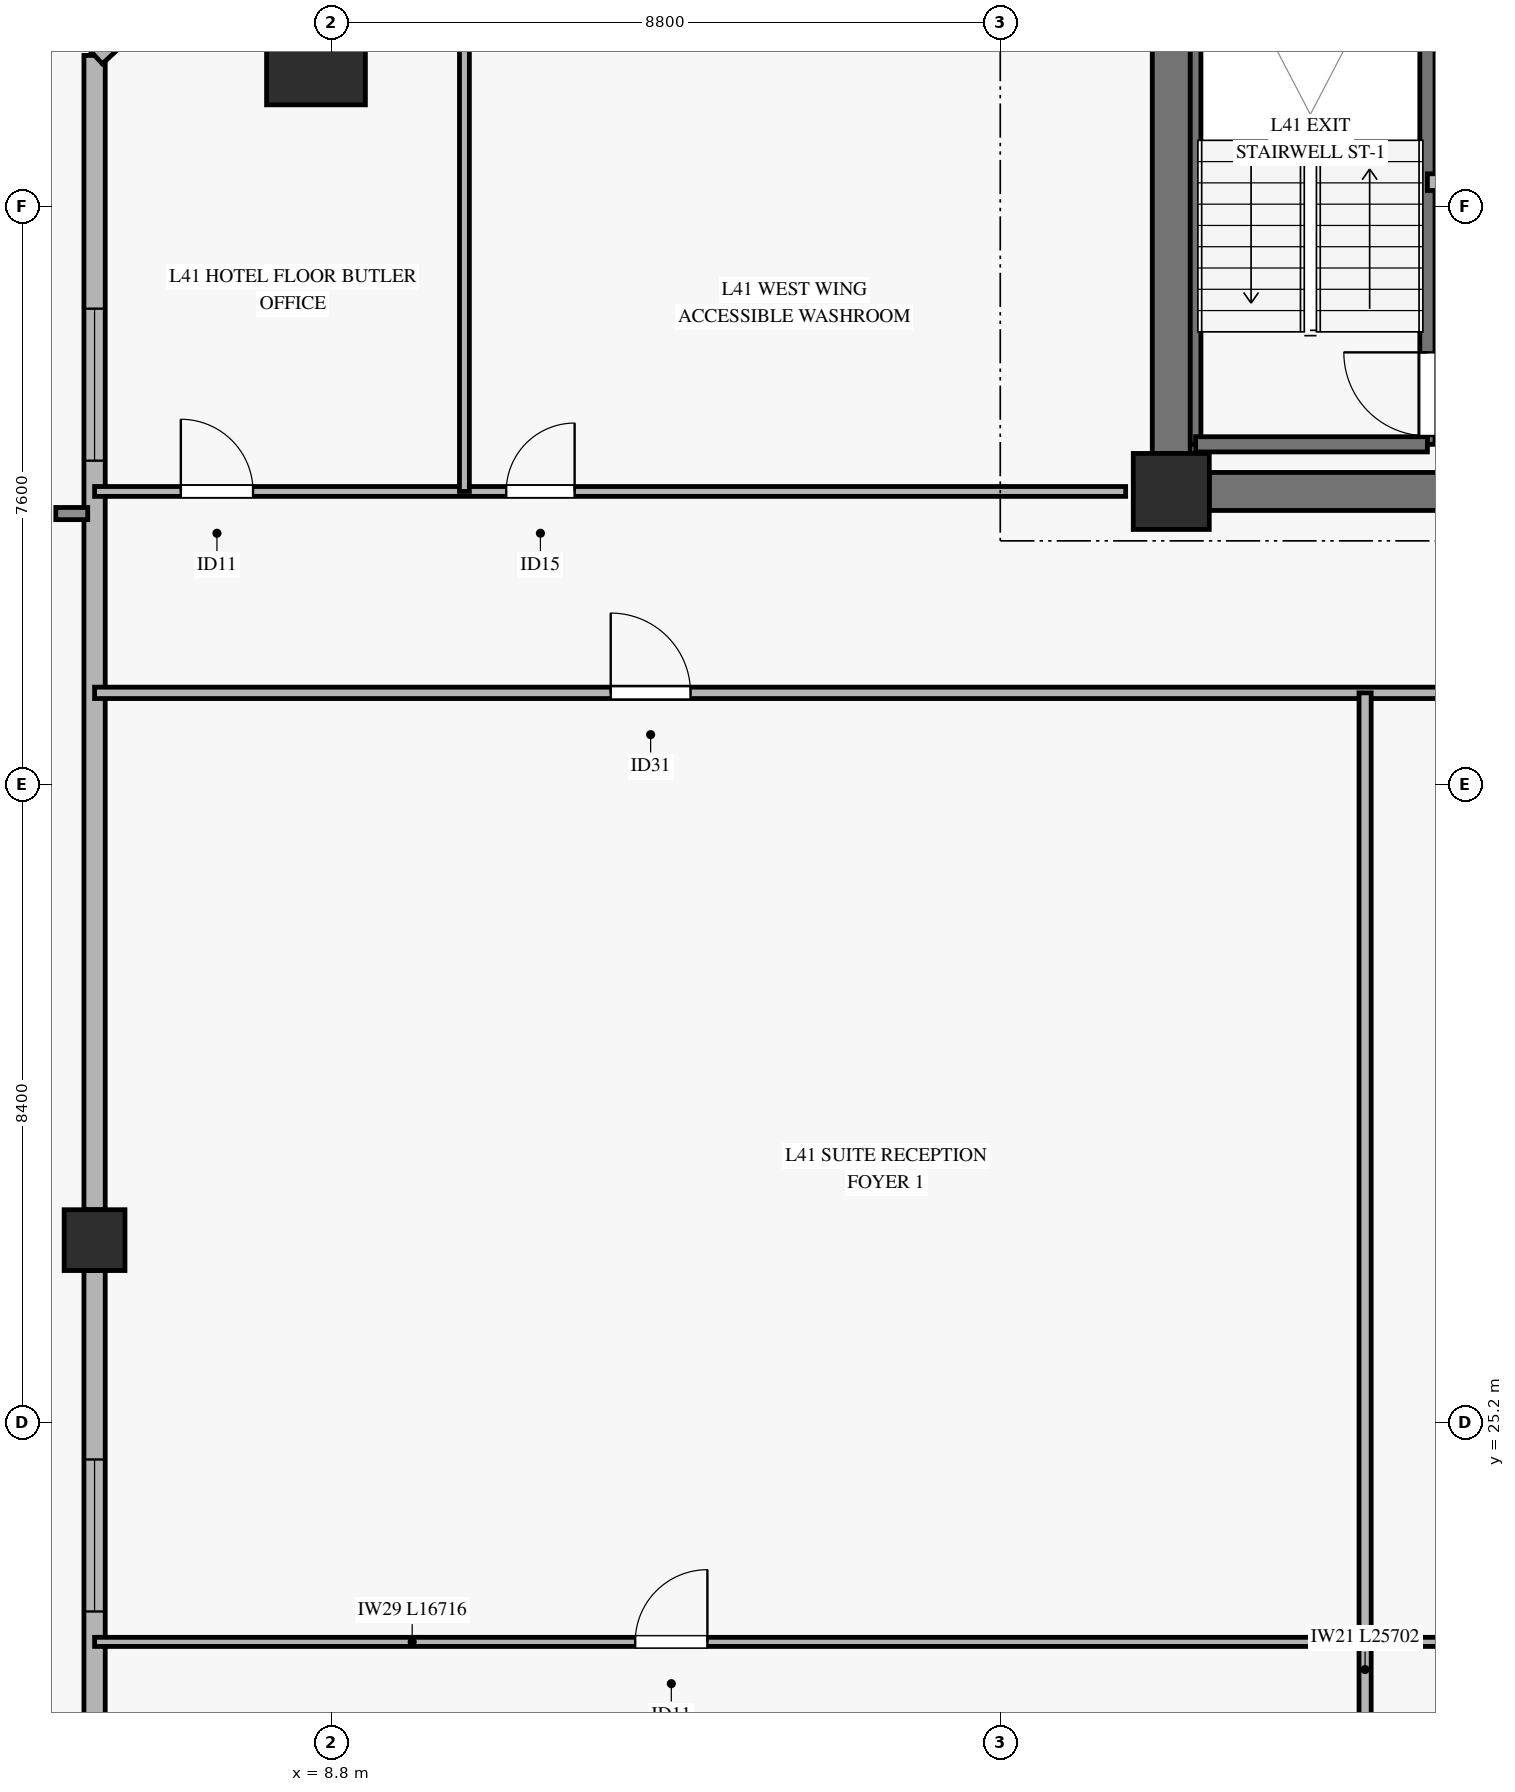
"""IFC4 building model, lengths in metres.
Left out: names, types, materials, properties, quantities, classifications, styles, units other than length and angle.
Written with IfcOpenShell. Run it as: python <this file> out.ifc"""

import sys

from ifc_helpers import new_model, si_unit, direction, frame, frame_2d, origin, origin_2d, place, context, subcontext, project, spatial, rectangle, hollow_rectangle, extrude, source, transform, mapped, element, fill, save


model = new_model("IFC4")
c1 = context("Model", 3, precision=1e-05, world=origin(), true_north=direction((0.0, 1.0)))
c2 = subcontext(c1, "Body", "Model", "MODEL_VIEW")
j1 = project(units=[si_unit("LENGTHUNIT", "METRE"), si_unit("PLANEANGLEUNIT", "RADIAN")], contexts=[c1])
p1 = place(None, origin())
s1 = spatial("IfcSite", under=j1, at=p1, CompositionType="ELEMENT")
p2 = place(p1, origin())
s2 = spatial("IfcBuilding", under=s1, at=p2, CompositionType="ELEMENT")
p3 = place(p2, frame((0.0, 0.0, 166.7)))
s3 = spatial("IfcBuildingStorey", under=s2, at=p3, CompositionType="ELEMENT", Elevation=166.7)
m1 = source(origin(), c2, "Body", "SweptSolid", [
    extrude(rectangle(XDim=1.0, YDim=1.0, at=origin_2d()), origin(), (0.0, 0.0, 1.0), 3.27),
])
p4 = place(p3, frame((19.85, 37.45, 0.0), z_axis=(0.0, 0.0, 1.0), x_axis=(1.0, 0.0, 0.0)))
e1 = element("IfcColumn", 1, at=p4, inside=s3, PredefinedType="PILASTER", context=c2, shape_type="MappedRepresentation", body=[
    mapped(m1, transform((0.0, 0.0, 0.0), x_axis=(1.0, 0.0, 0.0), y_axis=(0.0, 1.0, 0.0), z_axis=(0.0, 0.0, 1.0), scale=1.0)),
])
p5 = place(p3, frame((20.35, 37.45, 0.0), z_axis=(0.0, 0.0, 1.0), x_axis=(1.0, 0.0, 0.0)))
e2 = element("IfcWall", 2, at=p5, inside=s3, PredefinedType="SHEAR", context=c2, shape_type="SweptSolid", body=[
    extrude(rectangle(XDim=9.95, YDim=0.5, at=frame_2d((4.975, 0.0))), origin(), (0.0, 0.0, 1.0), 3.27),
])
p6 = place(p5, frame((4.2, 0.0, 0.0)))
e3 = element("IfcOpeningElement", 3, at=p6, cuts=e2, PredefinedType="OPENING", context=c2, shape_type="SweptSolid", body=[
    extrude(rectangle(XDim=1.2, YDim=2.15, at=frame_2d((0.6, 1.075))), frame((0.0, 0.26, 0.0), z_axis=(0.0, -1.0, 0.0), x_axis=(1.0, 0.0, 0.0)), (0.0, 0.0, 1.0), 0.52),
])
p7 = place(p3, frame((19.85, 37.95, 0.0), z_axis=(0.0, 0.0, 1.0), x_axis=(0.0, 1.0, 0.0)))
e4 = element("IfcWall", 4, at=p7, inside=s3, PredefinedType="SHEAR", context=c2, shape_type="SweptSolid", body=[
    extrude(rectangle(XDim=8.1, YDim=0.5, at=frame_2d((4.05, 0.0))), origin(), (0.0, 0.0, 1.0), 3.27),
])
m2 = source(origin(), c2, "Body", "SweptSolid", [
    extrude(hollow_rectangle(XDim=1.3, YDim=1.3, WallThickness=0.06, at=origin_2d()), origin(), (0.0, 0.0, 1.0), 3.277),
])
p8 = place(p3, frame((8.597, 43.187, 0.0), z_axis=(0.063777107469, 0.007897632467, 0.997932917567), x_axis=(-0.122893119903, 0.992419911671, 0.0)))
e5 = element("IfcColumn", 5, at=p8, inside=s3, PredefinedType="COLUMN", context=c2, shape_type="MappedRepresentation", body=[
    mapped(m2, transform((0.0, 0.0, 0.0), x_axis=(1.0, 0.0, 0.0), y_axis=(0.0, 1.0, 0.0), z_axis=(0.0, 0.0, 1.0), scale=1.0)),
])
m3 = source(origin(), c2, "Body", "SweptSolid", [
    extrude(hollow_rectangle(XDim=0.8, YDim=0.8, WallThickness=0.036, at=origin_2d()), origin(), (0.0, 0.0, 1.0), 3.289),
])
p9 = place(p3, frame((5.684, 27.599, 0.0), z_axis=(0.071407666962, 0.080240839902, 0.994214440003), x_axis=(-0.747027925172, 0.664792658664, 0.0)))
e6 = element("IfcColumn", 6, at=p9, inside=s3, PredefinedType="COLUMN", context=c2, shape_type="MappedRepresentation", body=[
    mapped(m3, transform((0.0, 0.0, 0.0), x_axis=(1.0, 0.0, 0.0), y_axis=(0.0, 1.0, 0.0), z_axis=(0.0, 0.0, 1.0), scale=1.0)),
])
p10 = place(p3, frame((5.684, 12.011, 0.0), z_axis=(0.0, 0.0, 1.0), x_axis=(0.0, 1.0, 0.0)))
e7 = element("IfcWall", 7, at=p10, inside=s3, PredefinedType="SOLIDWALL", context=c2, shape_type="SweptSolid", body=[
    extrude(rectangle(XDim=15.188, YDim=0.28, at=frame_2d((7.594, 0.0))), origin(), (0.0, 0.0, 1.0), 2.75),
])
p11 = place(p10, frame((3.189, 0.0, 0.45)))
e8 = element("IfcOpeningElement", 8, at=p11, cuts=e7, PredefinedType="OPENING", context=c2, shape_type="SweptSolid", body=[
    extrude(rectangle(XDim=2.0, YDim=2.0, at=frame_2d((1.0, 1.0))), frame((0.0, 0.15, 0.0), z_axis=(0.0, -1.0, 0.0), x_axis=(1.0, 0.0, 0.0)), (0.0, 0.0, 1.0), 0.3),
])
p12 = place(p10, frame((10.702, 0.0, 0.45)))
e9 = element("IfcOpeningElement", 9, at=p12, cuts=e7, PredefinedType="OPENING", context=c2, shape_type="SweptSolid", body=[
    extrude(rectangle(XDim=2.0, YDim=2.0, at=frame_2d((1.0, 1.0))), frame((0.0, 0.15, 0.0), z_axis=(0.0, -1.0, 0.0), x_axis=(1.0, 0.0, 0.0)), (0.0, 0.0, 1.0), 0.3),
])
p13 = place(p3, frame((5.684, 27.999, 0.0), z_axis=(0.0, 0.0, 1.0), x_axis=(0.0, 1.0, 0.0)))
e10 = element("IfcWall", 10, at=p13, inside=s3, PredefinedType="SOLIDWALL", context=c2, shape_type="SweptSolid", body=[
    extrude(rectangle(XDim=15.188, YDim=0.28, at=frame_2d((7.594, 0.0))), origin(), (0.0, 0.0, 1.0), 2.75),
])
p14 = place(p13, frame((9.856, 0.0, 0.45)))
e11 = element("IfcOpeningElement", 11, at=p14, cuts=e10, PredefinedType="OPENING", context=c2, shape_type="SweptSolid", body=[
    extrude(rectangle(XDim=2.0, YDim=2.0, at=frame_2d((1.0, 1.0))), frame((0.0, 0.15, 0.0), z_axis=(0.0, -1.0, 0.0), x_axis=(1.0, 0.0, 0.0)), (0.0, 0.0, 1.0), 0.3),
])
p15 = place(p3, frame((8.997, 46.25, 0.0), z_axis=(0.0, 0.0, 1.0), x_axis=(-0.734267997056, -0.678859711943, 0.0)))
e12 = element("IfcWall", 12, at=p15, inside=s3, PredefinedType="SOLIDWALL", context=c2, shape_type="SweptSolid", body=[
    extrude(rectangle(XDim=4.512, YDim=0.3, at=frame_2d((2.256, 0.0))), origin(), (0.0, 0.0, 1.0), 2.75),
])
p16 = place(p15, frame((1.456, 0.0, 0.45)))
e13 = element("IfcOpeningElement", 13, at=p16, cuts=e12, PredefinedType="OPENING", context=c2, shape_type="SweptSolid", body=[
    extrude(rectangle(XDim=1.6, YDim=2.0, at=frame_2d((0.8, 1.0))), frame((0.0, 0.16, 0.0), z_axis=(0.0, -1.0, 0.0), x_axis=(1.0, 0.0, 0.0)), (0.0, 0.0, 1.0), 0.32),
])
p17 = place(p3, frame((20.17, 38.07, 0.0), z_axis=(0.0, 0.0, 1.0), x_axis=(0.0, 1.0, 0.0)))
e14 = element("IfcWall", 14, at=p17, inside=s3, PredefinedType="SOLIDWALL", context=c2, shape_type="SweptSolid", body=[
    extrude(rectangle(XDim=7.25, YDim=0.14, at=frame_2d((3.625, 0.0))), origin(), (0.0, 0.0, 1.0), 3.5),
])
p18 = place(p3, frame((23.22, 38.07, 0.0), z_axis=(0.0, 0.0, 1.0), x_axis=(0.0, 1.0, 0.0)))
e15 = element("IfcWall", 15, at=p18, inside=s3, PredefinedType="SOLIDWALL", context=c2, shape_type="SweptSolid", body=[
    extrude(rectangle(XDim=7.25, YDim=0.2, at=frame_2d((3.625, 0.0))), origin(), (0.0, 0.0, 1.0), 3.5),
])
p19 = place(p18, frame((0.11, 0.0, 0.0)))
e16 = element("IfcOpeningElement", 16, at=p19, cuts=e15, PredefinedType="OPENING", context=c2, shape_type="SweptSolid", body=[
    extrude(rectangle(XDim=1.1, YDim=2.15, at=frame_2d((0.55, 1.075))), frame((0.0, 0.11, 0.0), z_axis=(0.0, -1.0, 0.0), x_axis=(1.0, 0.0, 0.0)), (0.0, 0.0, 1.0), 0.22),
])
p20 = place(p3, frame((20.17, 38.07, 0.0), z_axis=(0.0, 0.0, 1.0), x_axis=(1.0, 0.0, 0.0)))
e17 = element("IfcWall", 17, at=p20, inside=s3, PredefinedType="SOLIDWALL", context=c2, shape_type="SweptSolid", body=[
    extrude(rectangle(XDim=3.05, YDim=0.2, at=frame_2d((1.525, 0.0))), origin(), (0.0, 0.0, 1.0), 3.5),
])
p21 = place(p3, frame((23.22, 41.52, 0.0), z_axis=(0.0, 0.0, 1.0), x_axis=(1.0, 0.0, 0.0)))
e18 = element("IfcWall", 18, at=p21, inside=s3, PredefinedType="SOLIDWALL", context=c2, shape_type="SweptSolid", body=[
    extrude(rectangle(XDim=3.92, YDim=0.22, at=frame_2d((1.96, 0.0))), origin(), (0.0, 0.0, 1.0), 3.27),
])
p22 = place(p21, frame((0.5, 0.0, 0.0)))
e19 = element("IfcOpeningElement", 19, at=p22, cuts=e18, PredefinedType="OPENING", context=c2, shape_type="SweptSolid", body=[
    extrude(rectangle(XDim=1.1, YDim=2.2, at=frame_2d((0.55, 1.1))), frame((0.0, 0.12, 0.0), z_axis=(0.0, -1.0, 0.0), x_axis=(1.0, 0.0, 0.0)), (0.0, 0.0, 1.0), 0.24),
])
p23 = place(p21, frame((2.4, 0.0, 0.0)))
e20 = element("IfcOpeningElement", 20, at=p23, cuts=e18, PredefinedType="OPENING", context=c2, shape_type="SweptSolid", body=[
    extrude(rectangle(XDim=1.1, YDim=2.2, at=frame_2d((0.55, 1.1))), frame((0.0, 0.12, 0.0), z_axis=(0.0, -1.0, 0.0), x_axis=(1.0, 0.0, 0.0)), (0.0, 0.0, 1.0), 0.24),
])
p24 = place(p3, frame((5.684, 34.8, 0.0), z_axis=(0.0, 0.0, 1.0), x_axis=(1.0, 0.0, 0.0)))
e21 = element("IfcWall", 21, at=p24, inside=s3, PredefinedType="PARTITIONING", context=c2, shape_type="SweptSolid", body=[
    extrude(rectangle(XDim=59.032, YDim=0.15, at=frame_2d((29.516, 0.0))), origin(), (0.0, 0.0, 1.0), 2.455),
])
p25 = place(p24, frame((6.791, 0.0, 0.0)))
e22 = element("IfcOpeningElement", 22, at=p25, cuts=e21, PredefinedType="OPENING", context=c2, shape_type="SweptSolid", body=[
    extrude(rectangle(XDim=1.05, YDim=2.15, at=frame_2d((0.525, 1.075))), frame((0.0, 0.085, 0.0), z_axis=(0.0, -1.0, 0.0), x_axis=(1.0, 0.0, 0.0)), (0.0, 0.0, 1.0), 0.17),
])
p26 = place(p24, frame((19.241, 0.0, 0.0)))
e23 = element("IfcOpeningElement", 23, at=p26, cuts=e21, PredefinedType="OPENING", context=c2, shape_type="SweptSolid", body=[
    extrude(rectangle(XDim=1.05, YDim=2.15, at=frame_2d((0.525, 1.075))), frame((0.0, 0.085, 0.0), z_axis=(0.0, -1.0, 0.0), x_axis=(1.0, 0.0, 0.0)), (0.0, 0.0, 1.0), 0.17),
])
p27 = place(p24, frame((25.213, 0.0, 0.0)))
e24 = element("IfcOpeningElement", 24, at=p27, cuts=e21, PredefinedType="OPENING", context=c2, shape_type="SweptSolid", body=[
    extrude(rectangle(XDim=1.05, YDim=2.15, at=frame_2d((0.525, 1.075))), frame((0.0, 0.085, 0.0), z_axis=(0.0, -1.0, 0.0), x_axis=(1.0, 0.0, 0.0)), (0.0, 0.0, 1.0), 0.17),
])
p28 = place(p24, frame((31.086, 0.0, 0.0)))
e25 = element("IfcOpeningElement", 25, at=p28, cuts=e21, PredefinedType="OPENING", context=c2, shape_type="SweptSolid", body=[
    extrude(rectangle(XDim=1.05, YDim=2.15, at=frame_2d((0.525, 1.075))), frame((0.0, 0.085, 0.0), z_axis=(0.0, -1.0, 0.0), x_axis=(1.0, 0.0, 0.0)), (0.0, 0.0, 1.0), 0.17),
])
p29 = place(p24, frame((36.632, 0.0, 0.0)))
e26 = element("IfcOpeningElement", 26, at=p29, cuts=e21, PredefinedType="OPENING", context=c2, shape_type="SweptSolid", body=[
    extrude(rectangle(XDim=1.05, YDim=2.15, at=frame_2d((0.525, 1.075))), frame((0.0, 0.085, 0.0), z_axis=(0.0, -1.0, 0.0), x_axis=(1.0, 0.0, 0.0)), (0.0, 0.0, 1.0), 0.17),
])
p30 = place(p24, frame((46.936, 0.0, 0.0)))
e27 = element("IfcOpeningElement", 27, at=p30, cuts=e21, PredefinedType="OPENING", context=c2, shape_type="SweptSolid", body=[
    extrude(rectangle(XDim=1.05, YDim=2.15, at=frame_2d((0.525, 1.075))), frame((0.0, 0.085, 0.0), z_axis=(0.0, -1.0, 0.0), x_axis=(1.0, 0.0, 0.0)), (0.0, 0.0, 1.0), 0.17),
])
p31 = place(p3, frame((5.684, 22.313, 0.0), z_axis=(0.0, 0.0, 1.0), x_axis=(1.0, 0.0, 0.0)))
e28 = element("IfcWall", 28, at=p31, inside=s3, PredefinedType="PARTITIONING", context=c2, shape_type="SweptSolid", body=[
    extrude(rectangle(XDim=16.716, YDim=0.12, at=frame_2d((8.358, 0.0))), origin(), (0.0, 0.0, 1.0), 2.455),
])
p32 = place(p31, frame((7.113, 0.0, 0.0)))
e29 = element("IfcOpeningElement", 29, at=p32, cuts=e28, PredefinedType="OPENING", context=c2, shape_type="SweptSolid", body=[
    extrude(rectangle(XDim=0.95, YDim=2.1, at=frame_2d((0.475, 1.05))), frame((0.0, 0.07, 0.0), z_axis=(0.0, -1.0, 0.0), x_axis=(1.0, 0.0, 0.0)), (0.0, 0.0, 1.0), 0.14),
])
p33 = place(p3, frame((22.4, 9.098, 0.0), z_axis=(0.0, 0.0, 1.0), x_axis=(0.0, 1.0, 0.0)))
e30 = element("IfcWall", 30, at=p33, inside=s3, PredefinedType="PARTITIONING", context=c2, shape_type="SweptSolid", body=[
    extrude(rectangle(XDim=25.702, YDim=0.16, at=frame_2d((12.851, 0.0))), origin(), (0.0, 0.0, 1.0), 2.755),
])
p34 = place(p3, frame((22.4, 22.313, 0.0), z_axis=(0.0, 0.0, 1.0), x_axis=(1.0, 0.0, 0.0)))
e31 = element("IfcWall", 31, at=p34, inside=s3, PredefinedType="PARTITIONING", context=c2, shape_type="SweptSolid", body=[
    extrude(rectangle(XDim=6.2, YDim=0.12, at=frame_2d((3.1, 0.0))), origin(), (0.0, 0.0, 1.0), 3.27),
])
p35 = place(p34, frame((2.646, 0.0, 0.0)))
e32 = element("IfcOpeningElement", 32, at=p35, cuts=e31, PredefinedType="OPENING", context=c2, shape_type="SweptSolid", body=[
    extrude(rectangle(XDim=0.95, YDim=2.1, at=frame_2d((0.475, 1.05))), frame((0.0, 0.07, 0.0), z_axis=(0.0, -1.0, 0.0), x_axis=(1.0, 0.0, 0.0)), (0.0, 0.0, 1.0), 0.14),
])
p36 = place(p3, frame((5.684, 37.45, 0.0), z_axis=(0.0, 0.0, 1.0), x_axis=(1.0, 0.0, 0.0)))
e33 = element("IfcWall", 33, at=p36, inside=s3, PredefinedType="PARTITIONING", context=c2, shape_type="SweptSolid", body=[
    extrude(rectangle(XDim=13.566, YDim=0.13, at=frame_2d((6.783, 0.0))), origin(), (0.0, 0.0, 1.0), 2.755),
])
p37 = place(p36, frame((1.135, 0.0, 0.0)))
e34 = element("IfcOpeningElement", 34, at=p37, cuts=e33, PredefinedType="OPENING", context=c2, shape_type="SweptSolid", body=[
    extrude(rectangle(XDim=0.95, YDim=2.1, at=frame_2d((0.475, 1.05))), frame((0.0, 0.075, 0.0), z_axis=(0.0, -1.0, 0.0), x_axis=(1.0, 0.0, 0.0)), (0.0, 0.0, 1.0), 0.15),
])
p38 = place(p36, frame((5.416, 0.0, 0.0)))
e35 = element("IfcOpeningElement", 35, at=p38, cuts=e33, PredefinedType="OPENING", context=c2, shape_type="SweptSolid", body=[
    extrude(rectangle(XDim=0.9, YDim=2.1, at=frame_2d((0.45, 1.05))), frame((0.0, 0.075, 0.0), z_axis=(0.0, -1.0, 0.0), x_axis=(1.0, 0.0, 0.0)), (0.0, 0.0, 1.0), 0.15),
])
p39 = place(p3, frame((10.55, 37.45, 0.0), z_axis=(0.0, 0.0, 1.0), x_axis=(0.0, 1.0, 0.0)))
e36 = element("IfcWall", 36, at=p39, inside=s3, PredefinedType="PARTITIONING", context=c2, shape_type="SweptSolid", body=[
    extrude(rectangle(XDim=8.8, YDim=0.13, at=frame_2d((4.4, 0.0))), origin(), (0.0, 0.0, 1.0), 3.27),
])
m4 = source(origin(), c2, "Body", "SweptSolid", [
    extrude(rectangle(XDim=2.0, YDim=2.0, at=frame_2d((1.0, 1.0))), frame((0.0, 0.03, 0.0), z_axis=(0.0, -1.0, 0.0), x_axis=(1.0, 0.0, 0.0)), (0.0, 0.0, 1.0), 0.06),
])
p40 = place(p12, origin())
e37 = element("IfcWindow", 37, at=p40, inside=s3, PartitioningType="SINGLE_PANEL", PredefinedType="WINDOW", context=c2, shape_type="MappedRepresentation", body=[
    mapped(m4, transform((0.0, 0.0, 0.0), x_axis=(1.0, 0.0, 0.0), y_axis=(0.0, 1.0, 0.0), z_axis=(0.0, 0.0, 1.0), scale=1.0)),
])
fill(e9, e37)
p41 = place(p14, origin())
e38 = element("IfcWindow", 38, at=p41, inside=s3, PartitioningType="SINGLE_PANEL", PredefinedType="WINDOW", context=c2, shape_type="MappedRepresentation", body=[
    mapped(m4, transform((0.0, 0.0, 0.0), x_axis=(1.0, 0.0, 0.0), y_axis=(0.0, 1.0, 0.0), z_axis=(0.0, 0.0, 1.0), scale=1.0)),
])
fill(e11, e38)
m5 = source(origin(), c2, "Body", "SweptSolid", [
    extrude(rectangle(XDim=1.1, YDim=2.15, at=frame_2d((0.55, 1.075))), frame((0.0, 0.025, 0.0), z_axis=(0.0, -1.0, 0.0), x_axis=(1.0, 0.0, 0.0)), (0.0, 0.0, 1.0), 0.05),
])
p42 = place(p19, origin())
e39 = element("IfcDoor", 39, at=p42, inside=s3, OperationType="SINGLE_SWING_RIGHT", PredefinedType="DOOR", context=c2, shape_type="MappedRepresentation", body=[
    mapped(m5, transform((0.0, 0.0, 0.0), x_axis=(1.0, 0.0, 0.0), y_axis=(0.0, 1.0, 0.0), z_axis=(0.0, 0.0, 1.0), scale=1.0)),
])
fill(e16, e39)
m6 = source(origin(), c2, "Body", "SweptSolid", [
    extrude(rectangle(XDim=1.05, YDim=2.15, at=frame_2d((0.525, 1.075))), frame((0.0, 0.025, 0.0), z_axis=(0.0, -1.0, 0.0), x_axis=(1.0, 0.0, 0.0)), (0.0, 0.0, 1.0), 0.05),
])
p43 = place(p25, origin())
e40 = element("IfcDoor", 40, at=p43, inside=s3, OperationType="SINGLE_SWING_LEFT", PredefinedType="DOOR", context=c2, shape_type="MappedRepresentation", body=[
    mapped(m6, transform((0.0, 0.0, 0.0), x_axis=(1.0, 0.0, 0.0), y_axis=(0.0, 1.0, 0.0), z_axis=(0.0, 0.0, 1.0), scale=1.0)),
])
fill(e22, e40)
m7 = source(origin(), c2, "Body", "SweptSolid", [
    extrude(rectangle(XDim=0.95, YDim=2.1, at=frame_2d((0.475, 1.05))), frame((0.0, 0.025, 0.0), z_axis=(0.0, -1.0, 0.0), x_axis=(1.0, 0.0, 0.0)), (0.0, 0.0, 1.0), 0.05),
])
p44 = place(p32, origin())
e41 = element("IfcDoor", 41, at=p44, inside=s3, OperationType="SINGLE_SWING_RIGHT", PredefinedType="DOOR", context=c2, shape_type="MappedRepresentation", body=[
    mapped(m7, transform((0.0, 0.0, 0.0), x_axis=(1.0, 0.0, 0.0), y_axis=(0.0, 1.0, 0.0), z_axis=(0.0, 0.0, 1.0), scale=1.0)),
])
fill(e29, e41)
p45 = place(p37, origin())
e42 = element("IfcDoor", 42, at=p45, inside=s3, OperationType="SINGLE_SWING_LEFT", PredefinedType="DOOR", context=c2, shape_type="MappedRepresentation", body=[
    mapped(m7, transform((0.0, 0.0, 0.0), x_axis=(1.0, 0.0, 0.0), y_axis=(0.0, 1.0, 0.0), z_axis=(0.0, 0.0, 1.0), scale=1.0)),
])
fill(e34, e42)
m8 = source(origin(), c2, "Body", "SweptSolid", [
    extrude(rectangle(XDim=0.9, YDim=2.1, at=frame_2d((0.45, 1.05))), frame((0.0, 0.025, 0.0), z_axis=(0.0, -1.0, 0.0), x_axis=(1.0, 0.0, 0.0)), (0.0, 0.0, 1.0), 0.05),
])
p46 = place(p38, origin())
e43 = element("IfcDoor", 43, at=p46, inside=s3, OperationType="SINGLE_SWING_RIGHT", PredefinedType="DOOR", context=c2, shape_type="MappedRepresentation", body=[
    mapped(m8, transform((0.0, 0.0, 0.0), x_axis=(1.0, 0.0, 0.0), y_axis=(0.0, 1.0, 0.0), z_axis=(0.0, 0.0, 1.0), scale=1.0)),
])
fill(e35, e43)
save(model, sys.argv[1])
